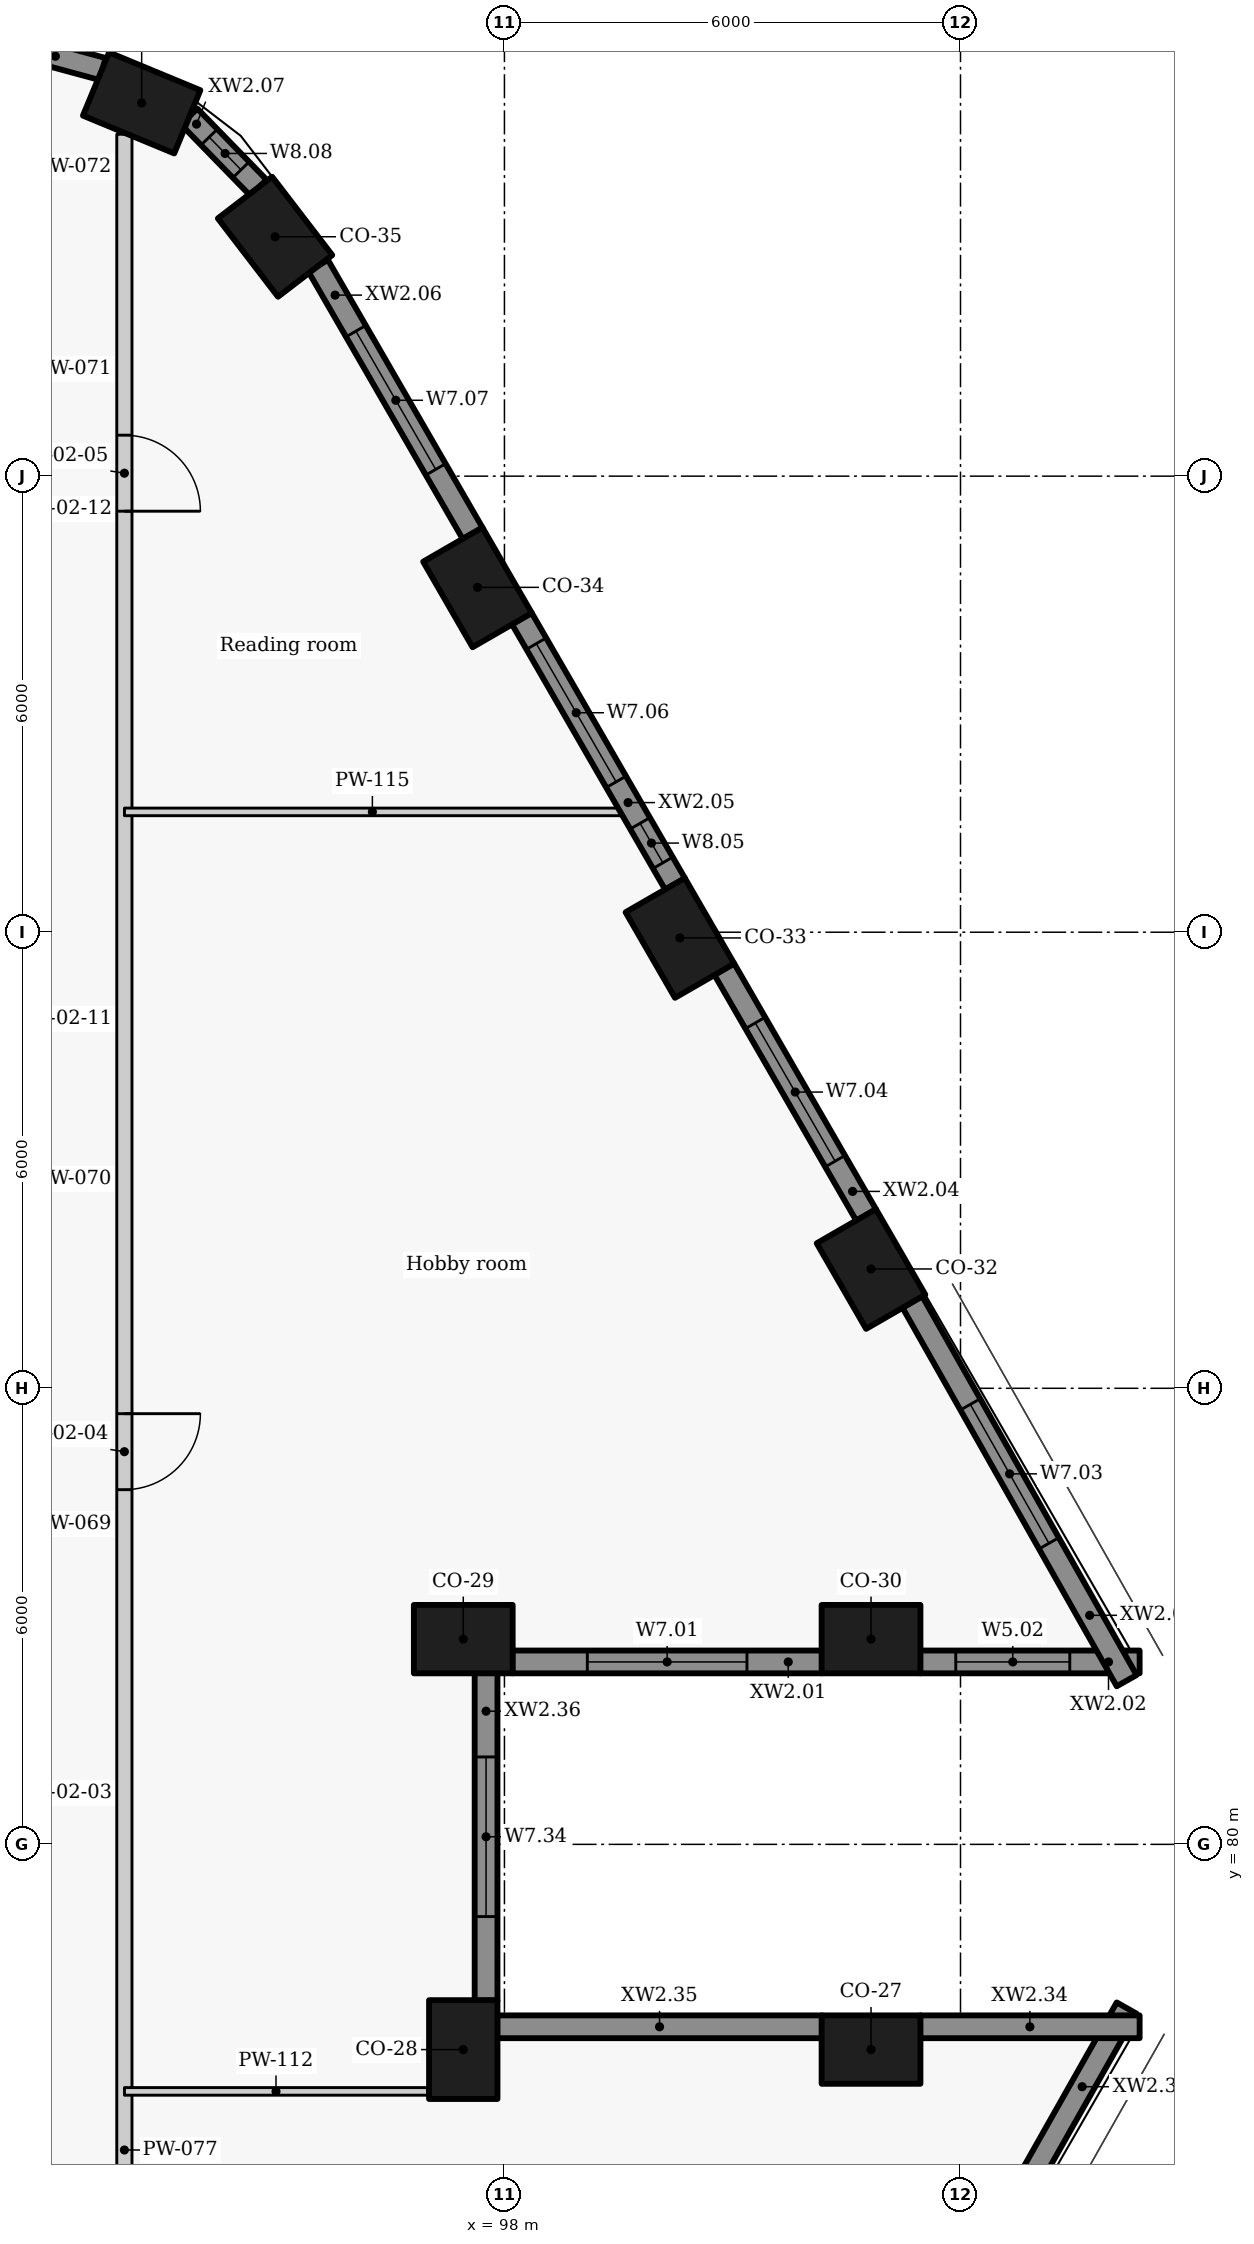
"""IFC4 building model, lengths in metres.
Left out: names, types, materials, properties, quantities, classifications, styles, units other than length and angle.
Written with IfcOpenShell. Run it as: python <this file> out.ifc"""

import sys

from ifc_helpers import new_model, si_unit, direction, frame, frame_2d, origin, origin_2d, place, context, subcontext, project, spatial, rectangle, extrude, element, fill, save


model = new_model("IFC4")
c1 = context("Model", 3, precision=1e-05, world=origin(), true_north=direction((0.0, 1.0)))
c2 = subcontext(c1, "Body", "Model", "MODEL_VIEW")
j1 = project(units=[si_unit("LENGTHUNIT", "METRE"), si_unit("PLANEANGLEUNIT", "RADIAN")], contexts=[c1])
p1 = place(None, origin())
s1 = spatial("IfcSite", under=j1, at=p1, CompositionType="ELEMENT")
p2 = place(p1, origin())
s2 = spatial("IfcBuilding", under=s1, at=p2, CompositionType="ELEMENT")
p3 = place(p2, frame((0.0, 0.0, 130.5)))
s3 = spatial("IfcBuildingStorey", under=s2, at=p3, CompositionType="ELEMENT", Elevation=130.5)
for number, where, z_axis, x_axis in (
    (1, (102.823, 77.3, 0.0), (0.0, 0.0, 1.0), (-1.0, 0.0, 0.0)),
    (2, (97.458, 77.3, 0.0), (0.0, 0.0, 1.0), (0.0, 1.0, 0.0)),
    (3, (97.458, 82.7, 0.0), (0.0, 0.0, 1.0), (1.0, 0.0, 0.0)),
    (4, (102.823, 82.7, 0.0), (0.0, 0.0, 1.0), (1.0, 0.0, 0.0)),
    (5, (102.823, 87.57, 0.0), (0.0, 0.0, 1.0), (-0.5, 0.866, 0.0)),
    (6, (100.308, 91.925, 0.0), (0.0, 0.0, 1.0), (-0.5, 0.866, 0.0)),
    (7, (97.646, 96.537, 0.0), (0.0, 0.0, 1.0), (-0.5, 0.866, 0.0)),
    (8, (94.982, 101.149, 0.0), (0.0, 0.0, 1.0), (-0.609, 0.793, 0.0)),
    (9, (93.227, 102.91, 0.0), (0.0, 0.0, 1.0), (-0.924, 0.383, 0.0)),
):
    element("IfcColumn", number, at=place(p3, frame(where, z_axis=z_axis, x_axis=x_axis)), inside=s3, PredefinedType="COLUMN", context=c2, shape_type="SweptSolid", body=[
        extrude(rectangle(XDim=1.3, YDim=0.9, at=origin_2d()), origin(), (0.0, 0.0, 1.0), 3.3),
    ])
p4 = place(p3, frame((98.104, 82.4, 0.0), z_axis=(0.0, 0.0, 1.0), x_axis=(1.0, 0.0, 0.0)))
e10 = element("IfcWall", 10, at=p4, inside=s3, PredefinedType="SOLIDWALL", context=c2, shape_type="SweptSolid", body=[
    extrude(rectangle(XDim=4.073, YDim=0.3, at=frame_2d((2.036, 0.0))), origin(), (0.0, 0.0, 1.0), 2.425),
])
p5 = place(p4, frame((0.986, 0.0, 0.9)))
e11 = element("IfcOpeningElement", 11, at=p5, cuts=e10, PredefinedType="OPENING", context=c2, shape_type="SweptSolid", body=[
    extrude(rectangle(XDim=2.1, YDim=1.1, at=frame_2d((1.05, 0.55))), frame((0.0, 0.16, 0.0), z_axis=(0.0, -1.0, 0.0), x_axis=(1.0, 0.0, 0.0)), (0.0, 0.0, 1.0), 0.32),
])
p6 = place(p3, frame((103.469, 82.4, 0.0), z_axis=(0.0, 0.0, 1.0), x_axis=(1.0, 0.0, 0.0)))
e12 = element("IfcWall", 12, at=p6, inside=s3, PredefinedType="SOLIDWALL", context=c2, shape_type="SweptSolid", body=[
    extrude(rectangle(XDim=2.888, YDim=0.3, at=frame_2d((1.444, 0.0))), origin(), (0.0, 0.0, 1.0), 2.425),
])
p7 = place(p6, frame((0.469, 0.0, 0.9)))
e13 = element("IfcOpeningElement", 13, at=p7, cuts=e12, PredefinedType="OPENING", context=c2, shape_type="SweptSolid", body=[
    extrude(rectangle(XDim=1.5, YDim=1.1, at=frame_2d((0.75, 0.55))), frame((0.0, 0.16, 0.0), z_axis=(0.0, -1.0, 0.0), x_axis=(1.0, 0.0, 0.0)), (0.0, 0.0, 1.0), 0.32),
])
p8 = place(p3, frame((106.186, 82.153, 0.0), z_axis=(0.0, 0.0, 1.0), x_axis=(-0.492498306264, 0.87031340236, 0.0)))
e14 = element("IfcWall", 14, at=p8, inside=s3, PredefinedType="SOLIDWALL", context=c2, shape_type="SweptSolid", body=[
    extrude(rectangle(XDim=5.727, YDim=0.3, at=frame_2d((2.863, 0.0))), origin(), (0.0, 0.0, 1.0), 2.425),
])
p9 = place(p8, frame((2.076, 0.0, 0.9)))
e15 = element("IfcOpeningElement", 15, at=p9, cuts=e14, PredefinedType="OPENING", context=c2, shape_type="SweptSolid", body=[
    extrude(rectangle(XDim=2.1, YDim=1.1, at=frame_2d((1.05, 0.55))), frame((0.0, 0.16, 0.0), z_axis=(0.0, -1.0, 0.0), x_axis=(1.0, 0.0, 0.0)), (0.0, 0.0, 1.0), 0.32),
])
p10 = place(p3, frame((102.76, 88.279, 0.0), z_axis=(0.0, 0.0, 1.0), x_axis=(-0.499933594891, 0.866063739398, 0.0)))
e16 = element("IfcWall", 16, at=p10, inside=s3, PredefinedType="SOLIDWALL", context=c2, shape_type="SweptSolid", body=[
    extrude(rectangle(XDim=3.737, YDim=0.3, at=frame_2d((1.868, 0.0))), origin(), (0.0, 0.0, 1.0), 2.425),
])
p11 = place(p10, frame((0.818, 0.0, 0.9)))
e17 = element("IfcOpeningElement", 17, at=p11, cuts=e16, PredefinedType="OPENING", context=c2, shape_type="SweptSolid", body=[
    extrude(rectangle(XDim=2.1, YDim=1.1, at=frame_2d((1.05, 0.55))), frame((0.0, 0.16, 0.0), z_axis=(0.0, -1.0, 0.0), x_axis=(1.0, 0.0, 0.0)), (0.0, 0.0, 1.0), 0.32),
])
p12 = place(p3, frame((100.245, 92.634, 0.0), z_axis=(0.0, 0.0, 1.0), x_axis=(-0.500031546601, 0.86600718958, 0.0)))
e18 = element("IfcWall", 18, at=p12, inside=s3, PredefinedType="SOLIDWALL", context=c2, shape_type="SweptSolid", body=[
    extrude(rectangle(XDim=4.034, YDim=0.3, at=frame_2d((2.017, 0.0))), origin(), (0.0, 0.0, 1.0), 2.425),
])
p13 = place(p12, frame((0.322, 0.0, 0.9)))
e19 = element("IfcOpeningElement", 19, at=p13, cuts=e18, PredefinedType="OPENING", context=c2, shape_type="SweptSolid", body=[
    extrude(rectangle(XDim=0.6, YDim=1.1, at=frame_2d((0.3, 0.55))), frame((0.0, 0.16, 0.0), z_axis=(0.0, -1.0, 0.0), x_axis=(1.0, 0.0, 0.0)), (0.0, 0.0, 1.0), 0.32),
])
p14 = place(p12, frame((1.552, 0.0, 0.9)))
e20 = element("IfcOpeningElement", 20, at=p14, cuts=e18, PredefinedType="OPENING", context=c2, shape_type="SweptSolid", body=[
    extrude(rectangle(XDim=2.1, YDim=1.1, at=frame_2d((1.05, 0.55))), frame((0.0, 0.16, 0.0), z_axis=(0.0, -1.0, 0.0), x_axis=(1.0, 0.0, 0.0)), (0.0, 0.0, 1.0), 0.32),
])
p15 = place(p3, frame((97.582, 97.247, 0.0), z_axis=(0.0, 0.0, 1.0), x_axis=(-0.500018589245, 0.866014671013, 0.0)))
e21 = element("IfcWall", 21, at=p15, inside=s3, PredefinedType="SOLIDWALL", context=c2, shape_type="SweptSolid", body=[
    extrude(rectangle(XDim=4.068, YDim=0.3, at=frame_2d((2.034, 0.0))), origin(), (0.0, 0.0, 1.0), 2.425),
])
p16 = place(p15, frame((0.973, 0.0, 0.9)))
e22 = element("IfcOpeningElement", 22, at=p16, cuts=e21, PredefinedType="OPENING", context=c2, shape_type="SweptSolid", body=[
    extrude(rectangle(XDim=2.1, YDim=1.1, at=frame_2d((1.05, 0.55))), frame((0.0, 0.16, 0.0), z_axis=(0.0, -1.0, 0.0), x_axis=(1.0, 0.0, 0.0)), (0.0, 0.0, 1.0), 0.32),
])
p17 = place(p3, frame((94.763, 101.795, 0.0), z_axis=(0.0, 0.0, 1.0), x_axis=(-0.697598997785, 0.716488407645, 0.0)))
e23 = element("IfcWall", 23, at=p17, inside=s3, PredefinedType="SOLIDWALL", context=c2, shape_type="SweptSolid", body=[
    extrude(rectangle(XDim=1.305, YDim=0.3, at=frame_2d((0.653, 0.0))), origin(), (0.0, 0.0, 1.0), 2.425),
])
p18 = place(p17, frame((0.328, 0.0, 0.9)))
e24 = element("IfcOpeningElement", 24, at=p18, cuts=e23, PredefinedType="OPENING", context=c2, shape_type="SweptSolid", body=[
    extrude(rectangle(XDim=0.6, YDim=1.1, at=frame_2d((0.3, 0.55))), frame((0.0, 0.16, 0.0), z_axis=(0.0, -1.0, 0.0), x_axis=(1.0, 0.0, 0.0)), (0.0, 0.0, 1.0), 0.32),
])
p19 = place(p3, frame((92.713, 103.356, 0.0), z_axis=(0.0, 0.0, 1.0), x_axis=(-0.965274225809, 0.26123872031, 0.0)))
e25 = element("IfcWall", 25, at=p19, inside=s3, PredefinedType="SOLIDWALL", context=c2, shape_type="SweptSolid", body=[
    extrude(rectangle(XDim=1.287, YDim=0.3, at=frame_2d((0.644, 0.0))), origin(), (0.0, 0.0, 1.0), 2.425),
])
p20 = place(p3, frame((103.366, 72.863, 0.0), z_axis=(0.0, 0.0, 1.0), x_axis=(0.492498306264, 0.87031340236, 0.0)))
e26 = element("IfcWall", 26, at=p20, inside=s3, PredefinedType="SOLIDWALL", context=c2, shape_type="SweptSolid", body=[
    extrude(rectangle(XDim=5.727, YDim=0.3, at=frame_2d((2.863, 0.0))), origin(), (0.0, 0.0, 1.0), 2.425),
])
p21 = place(p20, frame((1.148, 0.0, 0.9)))
e27 = element("IfcOpeningElement", 27, at=p21, cuts=e26, PredefinedType="OPENING", context=c2, shape_type="SweptSolid", body=[
    extrude(rectangle(XDim=2.1, YDim=1.1, at=frame_2d((1.05, 0.55))), frame((0.0, 0.16, 0.0), z_axis=(0.0, -1.0, 0.0), x_axis=(1.0, 0.0, 0.0)), (0.0, 0.0, 1.0), 0.32),
])
p22 = place(p3, frame((106.357, 77.6, 0.0), z_axis=(0.0, 0.0, 1.0), x_axis=(-1.0, 0.0, 0.0)))
e28 = element("IfcWall", 28, at=p22, inside=s3, PredefinedType="SOLIDWALL", context=c2, shape_type="SweptSolid", body=[
    extrude(rectangle(XDim=2.888, YDim=0.3, at=frame_2d((1.444, 0.0))), origin(), (0.0, 0.0, 1.0), 2.425),
])
p23 = place(p3, frame((102.177, 77.6, 0.0), z_axis=(0.0, 0.0, 1.0), x_axis=(-1.0, 0.0, 0.0)))
e29 = element("IfcWall", 29, at=p23, inside=s3, PredefinedType="SOLIDWALL", context=c2, shape_type="SweptSolid", body=[
    extrude(rectangle(XDim=4.273, YDim=0.3, at=frame_2d((2.136, 0.0))), origin(), (0.0, 0.0, 1.0), 2.425),
])
p24 = place(p3, frame((97.758, 77.946, 0.0), z_axis=(0.0, 0.0, 1.0), x_axis=(0.0, 1.0, 0.0)))
e30 = element("IfcWall", 30, at=p24, inside=s3, PredefinedType="SOLIDWALL", context=c2, shape_type="SweptSolid", body=[
    extrude(rectangle(XDim=4.308, YDim=0.3, at=frame_2d((2.154, 0.0))), origin(), (0.0, 0.0, 1.0), 2.425),
])
p25 = place(p24, frame((1.104, 0.0, 0.9)))
e31 = element("IfcOpeningElement", 31, at=p25, cuts=e30, PredefinedType="OPENING", context=c2, shape_type="SweptSolid", body=[
    extrude(rectangle(XDim=2.1, YDim=1.1, at=frame_2d((1.05, 0.55))), frame((0.0, 0.16, 0.0), z_axis=(0.0, -1.0, 0.0), x_axis=(1.0, 0.0, 0.0)), (0.0, 0.0, 1.0), 0.32),
])
p26 = place(p3, frame((93.0, 102.498, 0.0), z_axis=(0.0, 0.0, 1.0), x_axis=(0.0, -1.0, 0.0)))
e32 = element("IfcWall", 32, at=p26, inside=s3, PredefinedType="PARTITIONING", context=c2, shape_type="SweptSolid", body=[
    extrude(rectangle(XDim=45.665, YDim=0.2, at=frame_2d((22.833, 0.0))), origin(), (0.0, 0.0, 1.0), 2.405),
])
p27 = place(p26, frame((35.206, 0.0, 0.0)))
e33 = element("IfcOpeningElement", 33, at=p27, cuts=e32, PredefinedType="OPENING", context=c2, shape_type="SweptSolid", body=[
    extrude(rectangle(XDim=1.0, YDim=2.1, at=frame_2d((0.5, 1.05))), frame((0.0, 0.11, 0.0), z_axis=(0.0, -1.0, 0.0), x_axis=(1.0, 0.0, 0.0)), (0.0, 0.0, 1.0), 0.22),
])
p28 = place(p26, frame((16.832, 0.0, 0.0)))
e34 = element("IfcOpeningElement", 34, at=p28, cuts=e32, PredefinedType="OPENING", context=c2, shape_type="SweptSolid", body=[
    extrude(rectangle(XDim=1.0, YDim=2.1, at=frame_2d((0.5, 1.05))), frame((0.0, 0.11, 0.0), z_axis=(0.0, -1.0, 0.0), x_axis=(1.0, 0.0, 0.0)), (0.0, 0.0, 1.0), 0.22),
])
p29 = place(p26, frame((3.959, 0.0, 0.0)))
e35 = element("IfcOpeningElement", 35, at=p29, cuts=e32, PredefinedType="OPENING", context=c2, shape_type="SweptSolid", body=[
    extrude(rectangle(XDim=1.0, YDim=2.1, at=frame_2d((0.5, 1.05))), frame((0.0, 0.11, 0.0), z_axis=(0.0, -1.0, 0.0), x_axis=(1.0, 0.0, 0.0)), (0.0, 0.0, 1.0), 0.22),
])
p30 = place(p3, frame((93.001, 76.75, 0.0), z_axis=(0.0, 0.0, 1.0), x_axis=(1.0, 0.0, 0.0)))
e36 = element("IfcWall", 36, at=p30, inside=s3, PredefinedType="PARTITIONING", context=c2, shape_type="SweptSolid", body=[
    extrude(rectangle(XDim=3.987, YDim=0.1, at=frame_2d((1.994, 0.0))), origin(), (0.0, 0.0, 1.0), 3.025),
])
p31 = place(p3, frame((93.001, 93.583, 0.0), z_axis=(0.0, 0.0, 1.0), x_axis=(1.0, 0.0, 0.0)))
e37 = element("IfcWall", 37, at=p31, inside=s3, PredefinedType="PARTITIONING", context=c2, shape_type="SweptSolid", body=[
    extrude(rectangle(XDim=6.523, YDim=0.1, at=frame_2d((3.262, 0.0))), origin(), (0.0, 0.0, 1.0), 2.405),
])
p32 = place(p5, origin())
e38 = element("IfcWindow", 38, at=p32, inside=s3, PartitioningType="SINGLE_PANEL", PredefinedType="WINDOW", context=c2, shape_type="SweptSolid", body=[
    extrude(rectangle(XDim=2.1, YDim=1.1, at=frame_2d((1.05, 0.55))), frame((0.0, 0.03, 0.0), z_axis=(0.0, -1.0, 0.0), x_axis=(1.0, 0.0, 0.0)), (0.0, 0.0, 1.0), 0.06),
])
fill(e11, e38)
p33 = place(p7, origin())
e39 = element("IfcWindow", 39, at=p33, inside=s3, PartitioningType="SINGLE_PANEL", PredefinedType="WINDOW", context=c2, shape_type="SweptSolid", body=[
    extrude(rectangle(XDim=1.5, YDim=1.1, at=frame_2d((0.75, 0.55))), frame((0.0, 0.03, 0.0), z_axis=(0.0, -1.0, 0.0), x_axis=(1.0, 0.0, 0.0)), (0.0, 0.0, 1.0), 0.06),
])
fill(e13, e39)
p34 = place(p9, origin())
e40 = element("IfcWindow", 40, at=p34, inside=s3, PartitioningType="SINGLE_PANEL", PredefinedType="WINDOW", context=c2, shape_type="SweptSolid", body=[
    extrude(rectangle(XDim=2.1, YDim=1.1, at=frame_2d((1.05, 0.55))), frame((0.0, 0.03, 0.0), z_axis=(0.0, -1.0, 0.0), x_axis=(1.0, 0.0, 0.0)), (0.0, 0.0, 1.0), 0.06),
])
fill(e15, e40)
p35 = place(p11, origin())
e41 = element("IfcWindow", 41, at=p35, inside=s3, PartitioningType="SINGLE_PANEL", PredefinedType="WINDOW", context=c2, shape_type="SweptSolid", body=[
    extrude(rectangle(XDim=2.1, YDim=1.1, at=frame_2d((1.05, 0.55))), frame((0.0, 0.03, 0.0), z_axis=(0.0, -1.0, 0.0), x_axis=(1.0, 0.0, 0.0)), (0.0, 0.0, 1.0), 0.06),
])
fill(e17, e41)
p36 = place(p13, origin())
e42 = element("IfcWindow", 42, at=p36, inside=s3, PartitioningType="SINGLE_PANEL", PredefinedType="WINDOW", context=c2, shape_type="SweptSolid", body=[
    extrude(rectangle(XDim=0.6, YDim=1.1, at=frame_2d((0.3, 0.55))), frame((0.0, 0.03, 0.0), z_axis=(0.0, -1.0, 0.0), x_axis=(1.0, 0.0, 0.0)), (0.0, 0.0, 1.0), 0.06),
])
fill(e19, e42)
p37 = place(p14, origin())
e43 = element("IfcWindow", 43, at=p37, inside=s3, PartitioningType="SINGLE_PANEL", PredefinedType="WINDOW", context=c2, shape_type="SweptSolid", body=[
    extrude(rectangle(XDim=2.1, YDim=1.1, at=frame_2d((1.05, 0.55))), frame((0.0, 0.03, 0.0), z_axis=(0.0, -1.0, 0.0), x_axis=(1.0, 0.0, 0.0)), (0.0, 0.0, 1.0), 0.06),
])
fill(e20, e43)
p38 = place(p16, origin())
e44 = element("IfcWindow", 44, at=p38, inside=s3, PartitioningType="SINGLE_PANEL", PredefinedType="WINDOW", context=c2, shape_type="SweptSolid", body=[
    extrude(rectangle(XDim=2.1, YDim=1.1, at=frame_2d((1.05, 0.55))), frame((0.0, 0.03, 0.0), z_axis=(0.0, -1.0, 0.0), x_axis=(1.0, 0.0, 0.0)), (0.0, 0.0, 1.0), 0.06),
])
fill(e22, e44)
p39 = place(p18, origin())
e45 = element("IfcWindow", 45, at=p39, inside=s3, PartitioningType="SINGLE_PANEL", PredefinedType="WINDOW", context=c2, shape_type="SweptSolid", body=[
    extrude(rectangle(XDim=0.6, YDim=1.1, at=frame_2d((0.3, 0.55))), frame((0.0, 0.03, 0.0), z_axis=(0.0, -1.0, 0.0), x_axis=(1.0, 0.0, 0.0)), (0.0, 0.0, 1.0), 0.06),
])
fill(e24, e45)
p40 = place(p25, origin())
e46 = element("IfcWindow", 46, at=p40, inside=s3, PartitioningType="SINGLE_PANEL", PredefinedType="WINDOW", context=c2, shape_type="SweptSolid", body=[
    extrude(rectangle(XDim=2.1, YDim=1.1, at=frame_2d((1.05, 0.55))), frame((0.0, 0.03, 0.0), z_axis=(0.0, -1.0, 0.0), x_axis=(1.0, 0.0, 0.0)), (0.0, 0.0, 1.0), 0.06),
])
fill(e31, e46)
p41 = place(p28, origin())
e47 = element("IfcDoor", 47, at=p41, inside=s3, OperationType="SINGLE_SWING_LEFT", PredefinedType="DOOR", context=c2, shape_type="SweptSolid", body=[
    extrude(rectangle(XDim=1.0, YDim=2.1, at=frame_2d((0.5, 1.05))), frame((0.0, 0.025, 0.0), z_axis=(0.0, -1.0, 0.0), x_axis=(1.0, 0.0, 0.0)), (0.0, 0.0, 1.0), 0.05),
])
fill(e34, e47)
p42 = place(p29, origin())
e48 = element("IfcDoor", 48, at=p42, inside=s3, OperationType="SINGLE_SWING_RIGHT", PredefinedType="DOOR", context=c2, shape_type="SweptSolid", body=[
    extrude(rectangle(XDim=1.0, YDim=2.1, at=frame_2d((0.5, 1.05))), frame((0.0, 0.025, 0.0), z_axis=(0.0, -1.0, 0.0), x_axis=(1.0, 0.0, 0.0)), (0.0, 0.0, 1.0), 0.05),
])
fill(e35, e48)
save(model, sys.argv[1])
